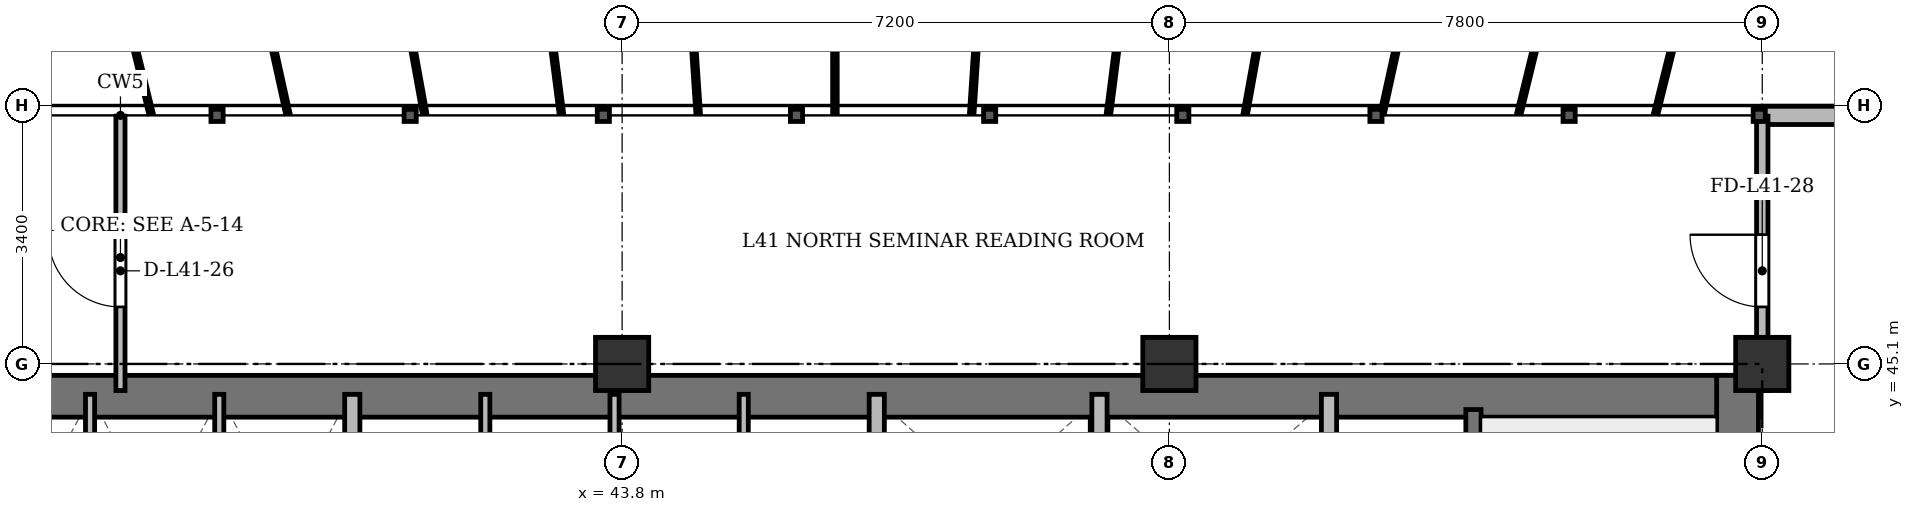
"""IFC4 building model, lengths in metres.
Left out: names, types, materials, properties, quantities, classifications, styles, units other than length and angle.
Written with IfcOpenShell. Run it as: python <this file> out.ifc"""

import sys

from ifc_helpers import new_model, si_unit, direction, frame, frame_2d, origin, origin_2d, place, context, subcontext, project, spatial, rectangle, extrude, source, transform, mapped, element, fill, save


model = new_model("IFC4")
c1 = context("Model", 3, precision=1e-05, world=origin(), true_north=direction((0.0, 1.0)))
c2 = subcontext(c1, "Body", "Model", "MODEL_VIEW")
j1 = project(units=[si_unit("LENGTHUNIT", "METRE"), si_unit("PLANEANGLEUNIT", "RADIAN")], contexts=[c1])
p1 = place(None, origin())
s1 = spatial("IfcSite", under=j1, at=p1, CompositionType="ELEMENT")
p2 = place(p1, origin())
s2 = spatial("IfcBuilding", under=s1, at=p2, CompositionType="ELEMENT")
p3 = place(p2, frame((0.0, 0.0, 157.3)))
s3 = spatial("IfcBuildingStorey", under=s2, at=p3, CompositionType="ELEMENT", Elevation=157.3)
m1 = source(origin(), c2, "Body", "SweptSolid", [
    extrude(rectangle(XDim=0.7, YDim=0.7, at=origin_2d()), origin(), (0.0, 0.0, 1.0), 3.6),
])
for number, where, z_axis, x_axis in (
    (1, (43.8, 45.1, 0.0), (0.0, 0.0, 1.0), (1.0, 0.0, 0.0)),
    (2, (51.0, 45.1, 0.0), (0.0, 0.0, 1.0), (1.0, 0.0, 0.0)),
    (3, (58.8, 45.1, 0.0), (0.0, 0.0, 1.0), (1.0, 0.0, 0.0)),
):
    element("IfcColumn", number, at=place(p3, frame(where, z_axis=z_axis, x_axis=x_axis)), inside=s3, PredefinedType="COLUMN", context=c2, shape_type="MappedRepresentation", body=[
        mapped(m1, transform((0.0, 0.0, 0.0), x_axis=(1.0, 0.0, 0.0), y_axis=(0.0, 1.0, 0.0), z_axis=(0.0, 0.0, 1.0), scale=1.0)),
    ])
p4 = place(p3, frame((58.8, 48.37, 0.0), z_axis=(0.0, 0.0, 1.0), x_axis=(1.0, 0.0, 0.0)))
e4 = element("IfcWall", 4, at=p4, inside=s3, PredefinedType="SOLIDWALL", context=c2, shape_type="SweptSolid", body=[
    extrude(rectangle(XDim=4.7, YDim=0.24, at=frame_2d((2.35, 0.0))), origin(), (0.0, 0.0, 1.0), 3.35),
])
p5 = place(p4, frame((1.293, 0.0, 0.9)))
e5 = element("IfcOpeningElement", 5, at=p5, cuts=e4, PredefinedType="OPENING", context=c2, shape_type="SweptSolid", body=[
    extrude(rectangle(XDim=1.35, YDim=1.5, at=frame_2d((0.675, 0.75))), frame((0.0, 0.13, 0.0), z_axis=(0.0, -1.0, 0.0), x_axis=(1.0, 0.0, 0.0)), (0.0, 0.0, 1.0), 0.26),
])
p6 = place(p3, frame((15.65, 44.675, 0.0), z_axis=(0.0, 0.0, 1.0), x_axis=(1.0, 0.0, 0.0)))
e6 = element("IfcWall", 6, at=p6, inside=s3, PredefinedType="SHEAR", context=c2, shape_type="SweptSolid", body=[
    extrude(rectangle(XDim=43.1, YDim=0.55, at=frame_2d((21.55, 0.0))), origin(), (0.0, 0.0, 1.0), 3.35),
])
p7 = place(p3, frame((58.475, 33.4, 0.0), z_axis=(0.0, 0.0, 1.0), x_axis=(0.0, 1.0, 0.0)))
e7 = element("IfcWall", 7, at=p7, inside=s3, PredefinedType="SHEAR", context=c2, shape_type="SweptSolid", body=[
    extrude(rectangle(XDim=11.55, YDim=0.55, at=frame_2d((5.775, 0.0))), origin(), (0.0, 0.0, 1.0), 3.35),
])
p8 = place(p3, frame((55.0, 33.4, 0.0), z_axis=(0.0, 0.0, 1.0), x_axis=(0.0, 1.0, 0.0)))
e8 = element("IfcWall", 8, at=p8, inside=s3, PredefinedType="SHEAR", context=c2, shape_type="SweptSolid", body=[
    extrude(rectangle(XDim=11.1, YDim=0.2, at=frame_2d((5.55, 0.0))), origin(), (0.0, 0.0, 1.0), 3.35),
])
p9 = place(p8, frame((0.85, 0.0, 0.0)))
e9 = element("IfcOpeningElement", 9, at=p9, cuts=e8, PredefinedType="OPENING", context=c2, shape_type="SweptSolid", body=[
    extrude(rectangle(XDim=1.1, YDim=2.15, at=frame_2d((0.55, 1.075))), frame((0.0, 0.11, 0.0), z_axis=(0.0, -1.0, 0.0), x_axis=(1.0, 0.0, 0.0)), (0.0, 0.0, 1.0), 0.22),
])
for number, where, z_axis, x_axis in (
    (10, (36.8, 41.5, 0.0), (0.0, 0.0, 1.0), (0.0, 1.0, 0.0)),
    (11, (38.5, 41.5, 0.0), (0.0, 0.0, 1.0), (0.0, 1.0, 0.0)),
):
    element("IfcWall", number, at=place(p3, frame(where, z_axis=z_axis, x_axis=x_axis)), inside=s3, PredefinedType="PARTITIONING", context=c2, shape_type="SweptSolid", body=[
        extrude(rectangle(XDim=3.2, YDim=0.12, at=frame_2d((1.6, 0.0))), origin(), (0.0, 0.0, 1.0), 3.35),
    ])
p10 = place(p3, frame((40.25, 41.5, 0.0), z_axis=(0.0, 0.0, 1.0), x_axis=(0.0, 1.0, 0.0)))
e12 = element("IfcWall", 12, at=p10, inside=s3, PredefinedType="SOLIDWALL", context=c2, shape_type="SweptSolid", body=[
    extrude(rectangle(XDim=3.2, YDim=0.2, at=frame_2d((1.6, 0.0))), origin(), (0.0, 0.0, 1.0), 3.35),
])
p11 = place(p3, frame((42.0, 41.5, 0.0), z_axis=(0.0, 0.0, 1.0), x_axis=(0.0, 1.0, 0.0)))
e13 = element("IfcWall", 13, at=p11, inside=s3, PredefinedType="PARTITIONING", context=c2, shape_type="SweptSolid", body=[
    extrude(rectangle(XDim=3.2, YDim=0.12, at=frame_2d((1.6, 0.0))), origin(), (0.0, 0.0, 1.0), 3.35),
])
p12 = place(p3, frame((43.7, 41.5, 0.0), z_axis=(0.0, 0.0, 1.0), x_axis=(0.0, 1.0, 0.0)))
e14 = element("IfcWall", 14, at=p12, inside=s3, PredefinedType="PARTITIONING", context=c2, shape_type="SweptSolid", body=[
    extrude(rectangle(XDim=3.2, YDim=0.12, at=frame_2d((1.6, 0.0))), origin(), (0.0, 0.0, 1.0), 2.85),
])
p13 = place(p3, frame((45.4, 41.5, 0.0), z_axis=(0.0, 0.0, 1.0), x_axis=(0.0, 1.0, 0.0)))
e15 = element("IfcWall", 15, at=p13, inside=s3, PredefinedType="PARTITIONING", context=c2, shape_type="SweptSolid", body=[
    extrude(rectangle(XDim=3.2, YDim=0.12, at=frame_2d((1.6, 0.0))), origin(), (0.0, 0.0, 1.0), 3.35),
])
p14 = place(p3, frame((47.15, 33.4, 0.0), z_axis=(0.0, 0.0, 1.0), x_axis=(0.0, 1.0, 0.0)))
e16 = element("IfcWall", 16, at=p14, inside=s3, PredefinedType="SOLIDWALL", context=c2, shape_type="SweptSolid", body=[
    extrude(rectangle(XDim=11.3, YDim=0.2, at=frame_2d((5.65, 0.0))), origin(), (0.0, 0.0, 1.0), 2.75),
])
for number, where, z_axis, x_axis in (
    (17, (50.08, 42.05, 0.0), (0.0, 0.0, 1.0), (0.0, 1.0, 0.0)),
    (18, (53.1, 42.05, 0.0), (0.0, 0.0, 1.0), (0.0, 1.0, 0.0)),
):
    element("IfcWall", number, at=place(p3, frame(where, z_axis=z_axis, x_axis=x_axis)), inside=s3, PredefinedType="SOLIDWALL", context=c2, shape_type="SweptSolid", body=[
        extrude(rectangle(XDim=2.65, YDim=0.2, at=frame_2d((1.325, 0.0))), origin(), (0.0, 0.0, 1.0), 3.35),
    ])
p15 = place(p3, frame((37.2, 44.75, 0.0), z_axis=(0.0, 0.0, 1.0), x_axis=(0.0, 1.0, 0.0)))
e19 = element("IfcWall", 19, at=p15, inside=s3, PredefinedType="PARTITIONING", context=c2, shape_type="SweptSolid", body=[
    extrude(rectangle(XDim=3.61, YDim=0.12, at=frame_2d((1.805, 0.0))), origin(), (0.0, 0.0, 1.0), 2.75),
])
p16 = place(p15, frame((1.1, 0.0, 0.0)))
e20 = element("IfcOpeningElement", 20, at=p16, cuts=e19, PredefinedType="OPENING", context=c2, shape_type="SweptSolid", body=[
    extrude(rectangle(XDim=0.95, YDim=2.15, at=frame_2d((0.475, 1.075))), frame((0.0, 0.07, 0.0), z_axis=(0.0, -1.0, 0.0), x_axis=(1.0, 0.0, 0.0)), (0.0, 0.0, 1.0), 0.14),
])
p17 = place(p3, frame((58.8, 44.75, 0.0), z_axis=(0.0, 0.0, 1.0), x_axis=(0.0, 1.0, 0.0)))
e21 = element("IfcWall", 21, at=p17, inside=s3, PredefinedType="PARTITIONING", context=c2, shape_type="SweptSolid", body=[
    extrude(rectangle(XDim=3.61, YDim=0.15, at=frame_2d((1.805, 0.0))), origin(), (0.0, 0.0, 1.0), 2.85),
])
p18 = place(p17, frame((1.1, 0.0, 0.0)))
e22 = element("IfcOpeningElement", 22, at=p18, cuts=e21, PredefinedType="OPENING", context=c2, shape_type="SweptSolid", body=[
    extrude(rectangle(XDim=0.95, YDim=2.15, at=frame_2d((0.475, 1.075))), frame((0.0, 0.085, 0.0), z_axis=(0.0, -1.0, 0.0), x_axis=(1.0, 0.0, 0.0)), (0.0, 0.0, 1.0), 0.17),
])
m2 = source(origin(), c2, "Body", "SweptSolid", [
    extrude(rectangle(XDim=0.95, YDim=2.15, at=frame_2d((0.475, 1.075))), frame((0.0, 0.025, 0.0), z_axis=(0.0, -1.0, 0.0), x_axis=(1.0, 0.0, 0.0)), (0.0, 0.0, 1.0), 0.05),
])
p19 = place(p16, origin())
e23 = element("IfcDoor", 23, at=p19, inside=s3, OperationType="SINGLE_SWING_RIGHT", PredefinedType="DOOR", context=c2, shape_type="MappedRepresentation", body=[
    mapped(m2, transform((0.0, 0.0, 0.0), x_axis=(1.0, 0.0, 0.0), y_axis=(0.0, 1.0, 0.0), z_axis=(0.0, 0.0, 1.0), scale=1.0)),
])
fill(e20, e23)
p20 = place(p18, origin())
e24 = element("IfcDoor", 24, at=p20, inside=s3, OperationType="SINGLE_SWING_RIGHT", PredefinedType="DOOR", context=c2, shape_type="MappedRepresentation", body=[
    mapped(m2, transform((0.0, 0.0, 0.0), x_axis=(1.0, 0.0, 0.0), y_axis=(0.0, 1.0, 0.0), z_axis=(0.0, 0.0, 1.0), scale=1.0)),
])
fill(e22, e24)
save(model, sys.argv[1])
